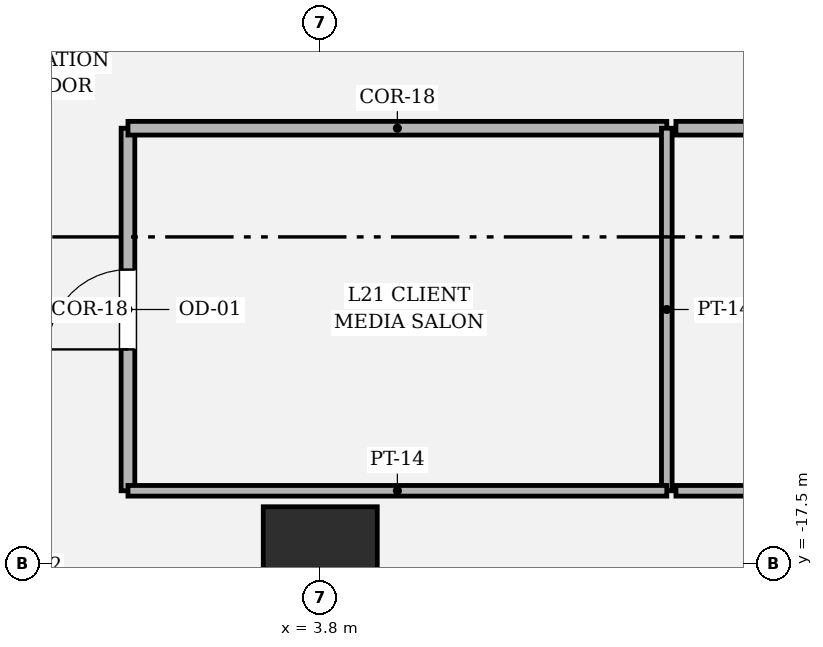
"""IFC4 building model, lengths in metres.
Left out: names, types, materials, properties, quantities, classifications, styles, units other than length and angle.
Written with IfcOpenShell. Run it as: python <this file> out.ifc"""

import sys

from ifc_helpers import new_model, si_unit, direction, frame, frame_2d, origin, origin_2d, place, context, subcontext, project, spatial, rectangle, hollow_rectangle, extrude, element, fill, save


model = new_model("IFC4")
c1 = context("Model", 3, precision=1e-05, world=origin(), true_north=direction((0.0, 1.0)))
c2 = subcontext(c1, "Body", "Model", "MODEL_VIEW")
j1 = project(units=[si_unit("LENGTHUNIT", "METRE"), si_unit("PLANEANGLEUNIT", "RADIAN")], contexts=[c1])
p1 = place(None, origin())
s1 = spatial("IfcSite", under=j1, at=p1, CompositionType="ELEMENT")
p2 = place(p1, origin())
s2 = spatial("IfcBuilding", under=s1, at=p2, CompositionType="ELEMENT")
p3 = place(p2, frame((0.0, 0.0, 93.0)))
s3 = spatial("IfcBuildingStorey", under=s2, at=p3, CompositionType="ELEMENT", Elevation=93.0)
p4 = place(p3, frame((3.8, -17.5, 0.0), z_axis=(0.0, 0.0, 1.0), x_axis=(1.0, 0.0, 0.0)))
e1 = element("IfcColumn", 1, at=p4, inside=s3, PredefinedType="COLUMN", context=c2, shape_type="SweptSolid", body=[
    extrude(hollow_rectangle(XDim=1.5, YDim=1.5, WallThickness=0.045, at=origin_2d()), origin(), (0.0, 0.0, 1.0), 4.05),
])
p5 = place(p3, frame((1.27, -16.54, 0.0), z_axis=(0.0, 0.0, 1.0), x_axis=(0.0, 1.0, 0.0)))
e2 = element("IfcWall", 2, at=p5, inside=s3, PredefinedType="PARTITIONING", context=c2, shape_type="SweptSolid", body=[
    extrude(rectangle(XDim=4.77, YDim=0.18, at=frame_2d((2.385, 0.0))), origin(), (0.0, 0.0, 1.0), 3.81),
])
p6 = place(p5, frame((1.86, 0.0, 0.0)))
e3 = element("IfcOpeningElement", 3, at=p6, cuts=e2, PredefinedType="OPENING", context=c2, shape_type="SweptSolid", body=[
    extrude(rectangle(XDim=1.05, YDim=2.2, at=frame_2d((0.525, 1.1))), frame((0.0, 0.1, 0.0), z_axis=(0.0, -1.0, 0.0), x_axis=(1.0, 0.0, 0.0)), (0.0, 0.0, 1.0), 0.2),
])
p7 = place(p3, frame((1.27, -11.77, 0.0), z_axis=(0.0, 0.0, 1.0), x_axis=(1.0, 0.0, 0.0)))
e4 = element("IfcWall", 4, at=p7, inside=s3, PredefinedType="PARTITIONING", context=c2, shape_type="SweptSolid", body=[
    extrude(rectangle(XDim=7.089, YDim=0.18, at=frame_2d((3.544, 0.0))), origin(), (0.0, 0.0, 1.0), 3.104),
])
p8 = place(p3, frame((8.359, -11.77, 0.0), z_axis=(0.0, 0.0, 1.0), x_axis=(0.0, -1.0, 0.0)))
e5 = element("IfcWall", 5, at=p8, inside=s3, PredefinedType="PARTITIONING", context=c2, shape_type="SweptSolid", body=[
    extrude(rectangle(XDim=4.77, YDim=0.14, at=frame_2d((2.385, 0.0))), origin(), (0.0, 0.0, 1.0), 3.81),
])
p9 = place(p3, frame((8.359, -16.54, 0.0), z_axis=(0.0, 0.0, 1.0), x_axis=(-1.0, 0.0, 0.0)))
e6 = element("IfcWall", 6, at=p9, inside=s3, PredefinedType="PARTITIONING", context=c2, shape_type="SweptSolid", body=[
    extrude(rectangle(XDim=7.089, YDim=0.14, at=frame_2d((3.544, 0.0))), origin(), (0.0, 0.0, 1.0), 3.104),
])
p10 = place(p3, frame((8.479, -11.77, 0.0), z_axis=(0.0, 0.0, 1.0), x_axis=(1.0, 0.0, 0.0)))
e7 = element("IfcWall", 7, at=p10, inside=s3, PredefinedType="PARTITIONING", context=c2, shape_type="SweptSolid", body=[
    extrude(rectangle(XDim=4.291, YDim=0.18, at=frame_2d((2.146, 0.0))), origin(), (0.0, 0.0, 1.0), 3.104),
])
p11 = place(p10, frame((1.621, 0.0, 0.0)))
e8 = element("IfcOpeningElement", 8, at=p11, cuts=e7, PredefinedType="OPENING", context=c2, shape_type="SweptSolid", body=[
    extrude(rectangle(XDim=1.05, YDim=2.2, at=frame_2d((0.525, 1.1))), frame((0.0, 0.1, 0.0), z_axis=(0.0, -1.0, 0.0), x_axis=(1.0, 0.0, 0.0)), (0.0, 0.0, 1.0), 0.2),
])
p12 = place(p3, frame((24.04, -16.54, 0.0), z_axis=(0.0, 0.0, 1.0), x_axis=(-1.0, 0.0, 0.0)))
e9 = element("IfcWall", 9, at=p12, inside=s3, PredefinedType="PARTITIONING", context=c2, shape_type="SweptSolid", body=[
    extrude(rectangle(XDim=15.561, YDim=0.14, at=frame_2d((7.781, 0.0))), origin(), (0.0, 0.0, 1.0), 3.104),
])
p13 = place(p6, origin())
e10 = element("IfcDoor", 10, at=p13, inside=s3, OperationType="SINGLE_SWING_LEFT", PredefinedType="DOOR", context=c2, shape_type="SweptSolid", body=[
    extrude(rectangle(XDim=1.05, YDim=2.2, at=frame_2d((0.525, 1.1))), frame((0.0, 0.025, 0.0), z_axis=(0.0, -1.0, 0.0), x_axis=(1.0, 0.0, 0.0)), (0.0, 0.0, 1.0), 0.05),
])
fill(e3, e10)
save(model, sys.argv[1])
